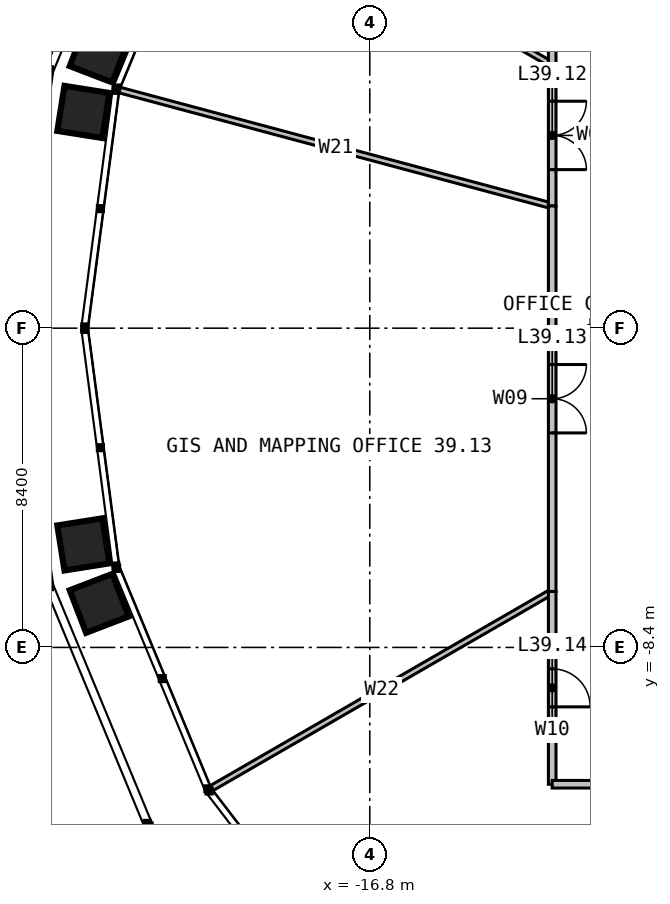
"""IFC4 building model, lengths in metres.
Left out: names, types, materials, properties, quantities, classifications, styles, units other than length and angle.
Written with IfcOpenShell. Run it as: python <this file> out.ifc"""

import sys

from ifc_helpers import new_model, si_unit, direction, frame, frame_2d, origin, place, context, subcontext, project, spatial, rectangle, extrude, element, fill, save


model = new_model("IFC4")
c1 = context("Model", 3, precision=1e-05, world=origin(), true_north=direction((0.0, 1.0)))
c2 = subcontext(c1, "Body", "Model", "MODEL_VIEW")
j1 = project(units=[si_unit("LENGTHUNIT", "METRE"), si_unit("PLANEANGLEUNIT", "RADIAN")], contexts=[c1])
p1 = place(None, origin())
s1 = spatial("IfcSite", under=j1, at=p1, CompositionType="ELEMENT")
p2 = place(p1, origin())
s2 = spatial("IfcBuilding", under=s1, at=p2, CompositionType="ELEMENT")
p3 = place(p2, frame((0.0, 0.0, 163.0)))
s3 = spatial("IfcBuildingStorey", under=s2, at=p3, CompositionType="ELEMENT", Elevation=163.0)
p4 = place(p3, frame((-12.0, 6.928, 0.0), z_axis=(0.0, 0.0, 1.0), x_axis=(-0.86602185845, 0.500006140648, 0.0)))
e1 = element("IfcWall", 1, at=p4, inside=s3, PredefinedType="PARTITIONING", context=c2, shape_type="SweptSolid", body=[
    extrude(rectangle(XDim=10.355, YDim=0.15, at=frame_2d((5.177, 0.0))), origin(), (0.0, 0.0, 1.0), 2.79),
])
p5 = place(p3, frame((-12.0, 3.215, 0.0), z_axis=(0.0, 0.0, 1.0), x_axis=(-0.965923829901, 0.25882649561, 0.0)))
e2 = element("IfcWall", 2, at=p5, inside=s3, PredefinedType="PARTITIONING", context=c2, shape_type="SweptSolid", body=[
    extrude(rectangle(XDim=11.788, YDim=0.15, at=frame_2d((5.894, 0.0))), origin(), (0.0, 0.0, 1.0), 2.79),
])
for number, where, z_axis, x_axis in (
    (3, (-12.0, -6.928, 0.0), (0.0, 0.0, 1.0), (-0.866, -0.5, 0.0)),
    (4, (-6.928, -12.0, 0.0), (0.0, 0.0, 1.0), (-0.5, -0.866, 0.0)),
):
    element("IfcWall", number, at=place(p3, frame(where, z_axis=z_axis, x_axis=x_axis)), inside=s3, PredefinedType="PARTITIONING", context=c2, shape_type="SweptSolid", body=[
        extrude(rectangle(XDim=10.355, YDim=0.15, at=frame_2d((5.177, 0.0))), origin(), (0.0, 0.0, 1.0), 2.79),
    ])
p6 = place(p3, frame((-12.0, 12.0, 0.0), z_axis=(0.0, 0.0, 1.0), x_axis=(0.0, -1.0, 0.0)))
e5 = element("IfcWall", 5, at=p6, inside=s3, PredefinedType="PARTITIONING", context=c2, shape_type="SweptSolid", body=[
    extrude(rectangle(XDim=5.072, YDim=0.2, at=frame_2d((2.536, 0.0))), origin(), (0.0, 0.0, 1.0), 3.8),
])
p7 = place(p6, frame((2.036, 0.0, 0.0)))
e6 = element("IfcOpeningElement", 6, at=p7, cuts=e5, PredefinedType="OPENING", context=c2, shape_type="SweptSolid", body=[
    extrude(rectangle(XDim=1.0, YDim=2.2, at=frame_2d((0.5, 1.1))), frame((0.0, 0.11, 0.0), z_axis=(0.0, -1.0, 0.0), x_axis=(1.0, 0.0, 0.0)), (0.0, 0.0, 1.0), 0.22),
])
p8 = place(p3, frame((-12.0, 6.928, 0.0), z_axis=(0.0, 0.0, 1.0), x_axis=(0.0, -1.0, 0.0)))
e7 = element("IfcWall", 7, at=p8, inside=s3, PredefinedType="PARTITIONING", context=c2, shape_type="SweptSolid", body=[
    extrude(rectangle(XDim=3.713, YDim=0.2, at=frame_2d((1.856, 0.0))), origin(), (0.0, 0.0, 1.0), 3.8),
])
p9 = place(p8, frame((0.956, 0.0, 0.0)))
e8 = element("IfcOpeningElement", 8, at=p9, cuts=e7, PredefinedType="OPENING", context=c2, shape_type="SweptSolid", body=[
    extrude(rectangle(XDim=1.8, YDim=2.2, at=frame_2d((0.9, 1.1))), frame((0.0, 0.11, 0.0), z_axis=(0.0, -1.0, 0.0), x_axis=(1.0, 0.0, 0.0)), (0.0, 0.0, 1.0), 0.22),
])
p10 = place(p3, frame((-12.0, 3.215, 0.0), z_axis=(0.0, 0.0, 1.0), x_axis=(0.0, -1.0, 0.0)))
e9 = element("IfcWall", 9, at=p10, inside=s3, PredefinedType="PARTITIONING", context=c2, shape_type="SweptSolid", body=[
    extrude(rectangle(XDim=10.144, YDim=0.2, at=frame_2d((5.072, 0.0))), origin(), (0.0, 0.0, 1.0), 3.8),
])
p11 = place(p10, frame((4.172, 0.0, 0.0)))
e10 = element("IfcOpeningElement", 10, at=p11, cuts=e9, PredefinedType="OPENING", context=c2, shape_type="SweptSolid", body=[
    extrude(rectangle(XDim=1.8, YDim=2.2, at=frame_2d((0.9, 1.1))), frame((0.0, 0.11, 0.0), z_axis=(0.0, -1.0, 0.0), x_axis=(1.0, 0.0, 0.0)), (0.0, 0.0, 1.0), 0.22),
])
p12 = place(p3, frame((-12.0, -6.928, 0.0), z_axis=(0.0, 0.0, 1.0), x_axis=(0.0, -1.0, 0.0)))
e11 = element("IfcWall", 11, at=p12, inside=s3, PredefinedType="PARTITIONING", context=c2, shape_type="SweptSolid", body=[
    extrude(rectangle(XDim=5.072, YDim=0.2, at=frame_2d((2.536, 0.0))), origin(), (0.0, 0.0, 1.0), 3.8),
])
p13 = place(p12, frame((2.036, 0.0, 0.0)))
e12 = element("IfcOpeningElement", 12, at=p13, cuts=e11, PredefinedType="OPENING", context=c2, shape_type="SweptSolid", body=[
    extrude(rectangle(XDim=1.0, YDim=2.2, at=frame_2d((0.5, 1.1))), frame((0.0, 0.11, 0.0), z_axis=(0.0, -1.0, 0.0), x_axis=(1.0, 0.0, 0.0)), (0.0, 0.0, 1.0), 0.22),
])
p14 = place(p3, frame((-12.0, -12.0, 0.0), z_axis=(0.0, 0.0, 1.0), x_axis=(1.0, 0.0, 0.0)))
e13 = element("IfcWall", 13, at=p14, inside=s3, PredefinedType="PARTITIONING", context=c2, shape_type="SweptSolid", body=[
    extrude(rectangle(XDim=5.072, YDim=0.2, at=frame_2d((2.536, 0.0))), origin(), (0.0, 0.0, 1.0), 3.8),
])
p15 = place(p9, origin())
e14 = element("IfcDoor", 14, at=p15, inside=s3, OperationType="DOUBLE_DOOR_SINGLE_SWING", PredefinedType="DOOR", context=c2, shape_type="SweptSolid", body=[
    extrude(rectangle(XDim=1.8, YDim=2.2, at=frame_2d((0.9, 1.1))), frame((0.0, 0.025, 0.0), z_axis=(0.0, -1.0, 0.0), x_axis=(1.0, 0.0, 0.0)), (0.0, 0.0, 1.0), 0.05),
])
fill(e8, e14)
p16 = place(p11, origin())
e15 = element("IfcDoor", 15, at=p16, inside=s3, OperationType="DOUBLE_DOOR_SINGLE_SWING", PredefinedType="DOOR", context=c2, shape_type="SweptSolid", body=[
    extrude(rectangle(XDim=1.8, YDim=2.2, at=frame_2d((0.9, 1.1))), frame((0.0, 0.025, 0.0), z_axis=(0.0, -1.0, 0.0), x_axis=(1.0, 0.0, 0.0)), (0.0, 0.0, 1.0), 0.05),
])
fill(e10, e15)
p17 = place(p13, origin())
e16 = element("IfcDoor", 16, at=p17, inside=s3, OperationType="SINGLE_SWING_RIGHT", PredefinedType="DOOR", context=c2, shape_type="SweptSolid", body=[
    extrude(rectangle(XDim=1.0, YDim=2.2, at=frame_2d((0.5, 1.1))), frame((0.0, 0.025, 0.0), z_axis=(0.0, -1.0, 0.0), x_axis=(1.0, 0.0, 0.0)), (0.0, 0.0, 1.0), 0.05),
])
fill(e12, e16)
save(model, sys.argv[1])
